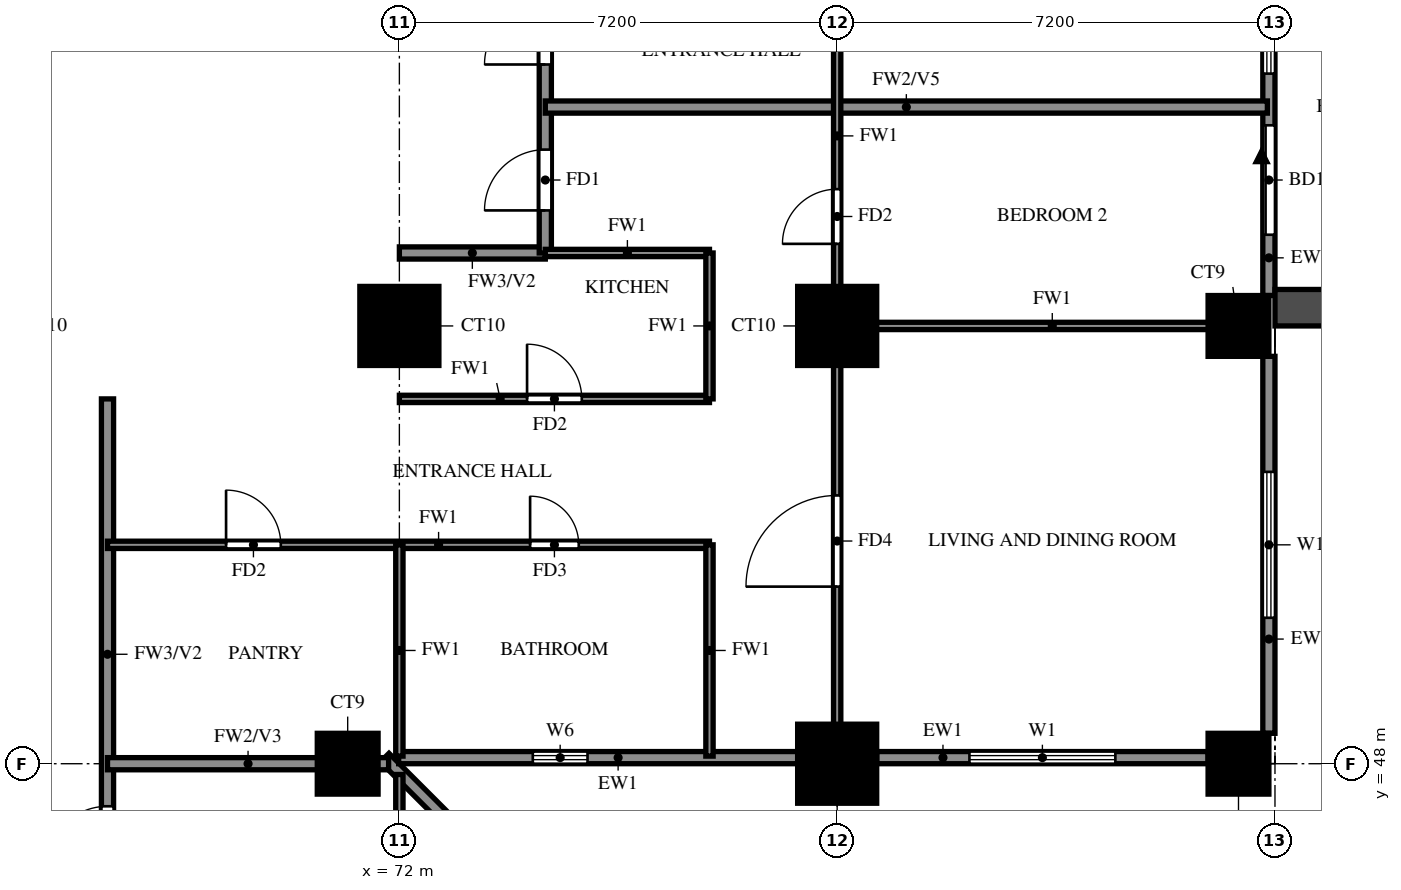
"""IFC4 building model, lengths in metres.
Left out: names, types, materials, properties, quantities, classifications, styles, units other than length and angle.
Written with IfcOpenShell. Run it as: python <this file> out.ifc"""

import sys

from ifc_helpers import new_model, si_unit, direction, frame, frame_2d, origin, origin_2d, place, context, subcontext, project, spatial, rectangle, extrude, source, transform, mapped, element, fill, save


model = new_model("IFC4")
c1 = context("Model", 3, precision=1e-05, world=origin(), true_north=direction((0.0, 1.0)))
c2 = subcontext(c1, "Body", "Model", "MODEL_VIEW")
j1 = project(units=[si_unit("LENGTHUNIT", "METRE"), si_unit("PLANEANGLEUNIT", "RADIAN")], contexts=[c1])
p1 = place(None, origin())
s1 = spatial("IfcSite", under=j1, at=p1, CompositionType="ELEMENT")
p2 = place(p1, origin())
s2 = spatial("IfcBuilding", under=s1, at=p2, CompositionType="ELEMENT")
p3 = place(p2, frame((0.0, 0.0, 86.5)))
s3 = spatial("IfcBuildingStorey", under=s2, at=p3, CompositionType="ELEMENT", Elevation=86.5)
m1 = source(origin(), c2, "Body", "SweptSolid", [
    extrude(rectangle(XDim=1.0, YDim=1.0, at=origin_2d()), origin(), (0.0, 0.0, 1.0), 3.18),
])
p4 = place(p3, frame((71.15, 48.0, 0.0), z_axis=(0.0, 0.0, 1.0), x_axis=(1.0, 0.0, 0.0)))
e1 = element("IfcColumn", 1, at=p4, inside=s3, PredefinedType="COLUMN", context=c2, shape_type="MappedRepresentation", body=[
    mapped(m1, transform((0.0, 0.0, 0.0))),
])
m2 = source(origin(), c2, "Body", "SweptSolid", [
    extrude(rectangle(XDim=1.3, YDim=1.3, at=origin_2d()), origin(), (0.0, 0.0, 1.0), 3.18),
])
p5 = place(p3, frame((79.2, 48.0, 0.0), z_axis=(0.0, 0.0, 1.0), x_axis=(1.0, 0.0, 0.0)))
e2 = element("IfcColumn", 2, at=p5, inside=s3, PredefinedType="COLUMN", context=c2, shape_type="MappedRepresentation", body=[
    mapped(m2, transform((0.0, 0.0, 0.0))),
])
p6 = place(p3, frame((85.8, 48.0, 0.0), z_axis=(0.0, 0.0, 1.0), x_axis=(1.0, 0.0, 0.0)))
e3 = element("IfcColumn", 3, at=p6, inside=s3, PredefinedType="COLUMN", context=c2, shape_type="MappedRepresentation", body=[
    mapped(m1, transform((0.0, 0.0, 0.0))),
])
for number, where, z_axis, x_axis in (
    (4, (72.0, 55.2, 0.0), (0.0, 0.0, 1.0), (1.0, 0.0, 0.0)),
    (5, (79.2, 55.2, 0.0), (0.0, 0.0, 1.0), (1.0, 0.0, 0.0)),
):
    element("IfcColumn", number, at=place(p3, frame(where, z_axis=z_axis, x_axis=x_axis)), inside=s3, PredefinedType="COLUMN", context=c2, shape_type="MappedRepresentation", body=[
        mapped(m2, transform((0.0, 0.0, 0.0))),
    ])
p7 = place(p3, frame((85.8, 55.2, 0.0), z_axis=(0.0, 0.0, 1.0), x_axis=(1.0, 0.0, 0.0)))
e6 = element("IfcColumn", 6, at=p7, inside=s3, PredefinedType="COLUMN", context=c2, shape_type="MappedRepresentation", body=[
    mapped(m1, transform((0.0, 0.0, 0.0))),
])
p8 = place(p3, frame((85.996, 33.863, 0.0), z_axis=(0.0, 0.0, 1.0), x_axis=(-0.707100718496, 0.707112843825, 0.0)))
e7 = element("IfcWall", 7, at=p8, inside=s3, PredefinedType="SOLIDWALL", context=c2, shape_type="SweptSolid", body=[
    extrude(rectangle(XDim=20.135, YDim=0.2, at=frame_2d((10.067, 0.0))), origin(), (0.0, 0.0, 1.0), 3.18),
])
p9 = place(p3, frame((71.989, 48.1, 0.0), z_axis=(0.0, 0.0, 1.0), x_axis=(1.0, 0.0, 0.0)))
e8 = element("IfcWall", 8, at=p9, inside=s3, PredefinedType="SOLIDWALL", context=c2, shape_type="SweptSolid", body=[
    extrude(rectangle(XDim=6.562, YDim=0.2, at=frame_2d((3.281, 0.0))), origin(), (0.0, 0.0, 1.0), 3.18),
])
p10 = place(p9, frame((2.206, 0.0, 1.5)))
e9 = element("IfcOpeningElement", 9, at=p10, cuts=e8, PredefinedType="OPENING", context=c2, shape_type="SweptSolid", body=[
    extrude(rectangle(XDim=0.9, YDim=0.9, at=frame_2d((0.45, 0.45))), frame((0.0, 0.11, 0.0), z_axis=(0.0, -1.0, 0.0), x_axis=(1.0, 0.0, 0.0)), (0.0, 0.0, 1.0), 0.22),
])
p11 = place(p3, frame((79.85, 48.1, 0.0), z_axis=(0.0, 0.0, 1.0), x_axis=(1.0, 0.0, 0.0)))
e10 = element("IfcWall", 10, at=p11, inside=s3, PredefinedType="SOLIDWALL", context=c2, shape_type="SweptSolid", body=[
    extrude(rectangle(XDim=5.45, YDim=0.2, at=frame_2d((2.725, 0.0))), origin(), (0.0, 0.0, 1.0), 3.18),
])
p12 = place(p11, frame((1.525, 0.0, 0.6)))
e11 = element("IfcOpeningElement", 11, at=p12, cuts=e10, PredefinedType="OPENING", context=c2, shape_type="SweptSolid", body=[
    extrude(rectangle(XDim=2.4, YDim=2.4, at=frame_2d((1.2, 1.2))), frame((0.0, 0.11, 0.0), z_axis=(0.0, -1.0, 0.0), x_axis=(1.0, 0.0, 0.0)), (0.0, 0.0, 1.0), 0.22),
])
p13 = place(p3, frame((86.3, 48.5, 0.0), z_axis=(0.0, 0.0, 1.0), x_axis=(0.0, 1.0, 0.0)))
e12 = element("IfcWall", 12, at=p13, inside=s3, PredefinedType="SOLIDWALL", context=c2, shape_type="SweptSolid", body=[
    extrude(rectangle(XDim=6.2, YDim=0.2, at=frame_2d((3.1, 0.0))), origin(), (0.0, 0.0, 1.0), 3.18),
])
p14 = place(p13, frame((1.9, 0.0, 0.6)))
e13 = element("IfcOpeningElement", 13, at=p14, cuts=e12, PredefinedType="OPENING", context=c2, shape_type="SweptSolid", body=[
    extrude(rectangle(XDim=2.4, YDim=2.4, at=frame_2d((1.2, 1.2))), frame((0.0, 0.11, 0.0), z_axis=(0.0, -1.0, 0.0), x_axis=(1.0, 0.0, 0.0)), (0.0, 0.0, 1.0), 0.22),
])
p15 = place(p3, frame((86.3, 55.7, 0.0), z_axis=(0.0, 0.0, 1.0), x_axis=(0.0, 1.0, 0.0)))
e14 = element("IfcWall", 14, at=p15, inside=s3, PredefinedType="SOLIDWALL", context=c2, shape_type="SweptSolid", body=[
    extrude(rectangle(XDim=6.2, YDim=0.2, at=frame_2d((3.1, 0.0))), origin(), (0.0, 0.0, 1.0), 3.18),
])
p16 = place(p15, frame((1.0, 0.0, 0.0)))
e15 = element("IfcOpeningElement", 15, at=p16, cuts=e14, PredefinedType="OPENING", context=c2, shape_type="SweptSolid", body=[
    extrude(rectangle(XDim=1.8, YDim=2.4, at=frame_2d((0.9, 1.2))), frame((0.0, 0.11, 0.0), z_axis=(0.0, -1.0, 0.0), x_axis=(1.0, 0.0, 0.0)), (0.0, 0.0, 1.0), 0.22),
])
p17 = place(p15, frame((3.65, 0.0, 0.6)))
e16 = element("IfcOpeningElement", 16, at=p17, cuts=e14, PredefinedType="OPENING", context=c2, shape_type="SweptSolid", body=[
    extrude(rectangle(XDim=1.8, YDim=2.4, at=frame_2d((0.9, 1.2))), frame((0.0, 0.11, 0.0), z_axis=(0.0, -1.0, 0.0), x_axis=(1.0, 0.0, 0.0)), (0.0, 0.0, 1.0), 0.22),
])
p18 = place(p3, frame((86.4, 55.5, 0.0), z_axis=(0.0, 0.0, 1.0), x_axis=(1.0, 0.0, 0.0)))
e17 = element("IfcWall", 17, at=p18, inside=s3, PredefinedType="SOLIDWALL", context=c2, shape_type="SweptSolid", body=[
    extrude(rectangle(XDim=2.7, YDim=0.6, at=frame_2d((1.35, 0.0))), origin(), (0.0, 0.0, 1.0), 2.85),
])
p19 = place(p3, frame((72.0, 56.4, 0.0), z_axis=(0.0, 0.0, 1.0), x_axis=(1.0, 0.0, 0.0)))
e18 = element("IfcWall", 18, at=p19, inside=s3, PredefinedType="SOLIDWALL", context=c2, shape_type="SweptSolid", body=[
    extrude(rectangle(XDim=2.4, YDim=0.2, at=frame_2d((1.2, 0.0))), origin(), (0.0, 0.0, 1.0), 3.18),
])
p20 = place(p3, frame((67.2, 45.6, 0.0), z_axis=(0.0, 0.0, 1.0), x_axis=(0.0, 1.0, 0.0)))
e19 = element("IfcWall", 19, at=p20, inside=s3, PredefinedType="SOLIDWALL", context=c2, shape_type="SweptSolid", body=[
    extrude(rectangle(XDim=8.4, YDim=0.2, at=frame_2d((4.2, 0.0))), origin(), (0.0, 0.0, 1.0), 3.18),
])
p21 = place(p20, frame((0.7, 0.0, 0.0)))
e20 = element("IfcOpeningElement", 20, at=p21, cuts=e19, PredefinedType="OPENING", context=c2, shape_type="SweptSolid", body=[
    extrude(rectangle(XDim=1.0, YDim=2.1, at=frame_2d((0.5, 1.05))), frame((0.0, 0.11, 0.0), z_axis=(0.0, -1.0, 0.0), x_axis=(1.0, 0.0, 0.0)), (0.0, 0.0, 1.0), 0.22),
])
p22 = place(p3, frame((74.4, 56.4, 0.0), z_axis=(0.0, 0.0, 1.0), x_axis=(0.0, 1.0, 0.0)))
e21 = element("IfcWall", 21, at=p22, inside=s3, PredefinedType="SOLIDWALL", context=c2, shape_type="SweptSolid", body=[
    extrude(rectangle(XDim=9.6, YDim=0.2, at=frame_2d((4.8, 0.0))), origin(), (0.0, 0.0, 1.0), 3.18),
])
p23 = place(p22, frame((0.7, 0.0, 0.0)))
e22 = element("IfcOpeningElement", 22, at=p23, cuts=e21, PredefinedType="OPENING", context=c2, shape_type="SweptSolid", body=[
    extrude(rectangle(XDim=1.0, YDim=2.1, at=frame_2d((0.5, 1.05))), frame((0.0, 0.11, 0.0), z_axis=(0.0, -1.0, 0.0), x_axis=(1.0, 0.0, 0.0)), (0.0, 0.0, 1.0), 0.22),
])
p24 = place(p22, frame((3.1, 0.0, 0.0)))
e23 = element("IfcOpeningElement", 23, at=p24, cuts=e21, PredefinedType="OPENING", context=c2, shape_type="SweptSolid", body=[
    extrude(rectangle(XDim=1.0, YDim=2.1, at=frame_2d((0.5, 1.05))), frame((0.0, 0.11, 0.0), z_axis=(0.0, -1.0, 0.0), x_axis=(1.0, 0.0, 0.0)), (0.0, 0.0, 1.0), 0.22),
])
p25 = place(p3, frame((67.2, 48.0, 0.0), z_axis=(0.0, 0.0, 1.0), x_axis=(1.0, 0.0, 0.0)))
e24 = element("IfcWall", 24, at=p25, inside=s3, PredefinedType="SOLIDWALL", context=c2, shape_type="SweptSolid", body=[
    extrude(rectangle(XDim=4.623, YDim=0.2, at=frame_2d((2.312, 0.0))), origin(), (0.0, 0.0, 1.0), 3.18),
])
p26 = place(p3, frame((74.4, 58.8, 0.0), z_axis=(0.0, 0.0, 1.0), x_axis=(1.0, 0.0, 0.0)))
e25 = element("IfcWall", 25, at=p26, inside=s3, PredefinedType="SOLIDWALL", context=c2, shape_type="SweptSolid", body=[
    extrude(rectangle(XDim=11.875, YDim=0.2, at=frame_2d((5.938, 0.0))), origin(), (0.0, 0.0, 1.0), 2.28),
])
p27 = place(p3, frame((67.2, 51.6, 0.0), z_axis=(0.0, 0.0, 1.0), x_axis=(1.0, 0.0, 0.0)))
e26 = element("IfcWall", 26, at=p27, inside=s3, PredefinedType="PARTITIONING", context=c2, shape_type="SweptSolid", body=[
    extrude(rectangle(XDim=9.9, YDim=0.12, at=frame_2d((4.95, 0.0))), origin(), (0.0, 0.0, 1.0), 3.18),
])
p28 = place(p27, frame((6.95, 0.0, 0.0)))
e27 = element("IfcOpeningElement", 27, at=p28, cuts=e26, PredefinedType="OPENING", context=c2, shape_type="SweptSolid", body=[
    extrude(rectangle(XDim=0.8, YDim=2.1, at=frame_2d((0.4, 1.05))), frame((0.0, 0.07, 0.0), z_axis=(0.0, -1.0, 0.0), x_axis=(1.0, 0.0, 0.0)), (0.0, 0.0, 1.0), 0.14),
])
p29 = place(p27, frame((1.95, 0.0, 0.0)))
e28 = element("IfcOpeningElement", 28, at=p29, cuts=e26, PredefinedType="OPENING", context=c2, shape_type="SweptSolid", body=[
    extrude(rectangle(XDim=0.9, YDim=2.1, at=frame_2d((0.45, 1.05))), frame((0.0, 0.07, 0.0), z_axis=(0.0, -1.0, 0.0), x_axis=(1.0, 0.0, 0.0)), (0.0, 0.0, 1.0), 0.14),
])
p30 = place(p3, frame((72.0, 54.0, 0.0), z_axis=(0.0, 0.0, 1.0), x_axis=(1.0, 0.0, 0.0)))
e29 = element("IfcWall", 29, at=p30, inside=s3, PredefinedType="PARTITIONING", context=c2, shape_type="SweptSolid", body=[
    extrude(rectangle(XDim=5.1, YDim=0.12, at=frame_2d((2.55, 0.0))), origin(), (0.0, 0.0, 1.0), 3.18),
])
p31 = place(p30, frame((2.1, 0.0, 0.0)))
e30 = element("IfcOpeningElement", 30, at=p31, cuts=e29, PredefinedType="OPENING", context=c2, shape_type="SweptSolid", body=[
    extrude(rectangle(XDim=0.9, YDim=2.1, at=frame_2d((0.45, 1.05))), frame((0.0, 0.07, 0.0), z_axis=(0.0, -1.0, 0.0), x_axis=(1.0, 0.0, 0.0)), (0.0, 0.0, 1.0), 0.14),
])
p32 = place(p3, frame((79.2, 55.2, 0.0), z_axis=(0.0, 0.0, 1.0), x_axis=(1.0, 0.0, 0.0)))
e31 = element("IfcWall", 31, at=p32, inside=s3, PredefinedType="PARTITIONING", context=c2, shape_type="SweptSolid", body=[
    extrude(rectangle(XDim=7.075, YDim=0.12, at=frame_2d((3.538, 0.0))), origin(), (0.0, 0.0, 1.0), 3.18),
])
p33 = place(p3, frame((74.4, 56.4, 0.0), z_axis=(0.0, 0.0, 1.0), x_axis=(1.0, 0.0, 0.0)))
e32 = element("IfcWall", 32, at=p33, inside=s3, PredefinedType="PARTITIONING", context=c2, shape_type="SweptSolid", body=[
    extrude(rectangle(XDim=2.7, YDim=0.12, at=frame_2d((1.35, 0.0))), origin(), (0.0, 0.0, 1.0), 3.18),
])
p34 = place(p3, frame((72.0, 33.725, 0.0), z_axis=(0.0, 0.0, 1.0), x_axis=(0.0, 1.0, 0.0)))
e33 = element("IfcWall", 33, at=p34, inside=s3, PredefinedType="PARTITIONING", context=c2, shape_type="SweptSolid", body=[
    extrude(rectangle(XDim=14.098, YDim=0.12, at=frame_2d((7.049, 0.0))), origin(), (0.0, 0.0, 1.0), 2.28),
])
p35 = place(p34, frame((10.075, 0.0, 0.0)))
e34 = element("IfcOpeningElement", 34, at=p35, cuts=e33, PredefinedType="OPENING", context=c2, shape_type="SweptSolid", body=[
    extrude(rectangle(XDim=0.9, YDim=2.1, at=frame_2d((0.45, 1.05))), frame((0.0, 0.07, 0.0), z_axis=(0.0, -1.0, 0.0), x_axis=(1.0, 0.0, 0.0)), (0.0, 0.0, 1.0), 0.14),
])
for number, where, z_axis, x_axis in (
    (35, (72.0, 48.125, 0.0), (0.0, 0.0, 1.0), (0.0, 1.0, 0.0)),
    (36, (77.1, 48.125, 0.0), (0.0, 0.0, 1.0), (0.0, 1.0, 0.0)),
):
    element("IfcWall", number, at=place(p3, frame(where, z_axis=z_axis, x_axis=x_axis)), inside=s3, PredefinedType="PARTITIONING", context=c2, shape_type="SweptSolid", body=[
        extrude(rectangle(XDim=3.475, YDim=0.12, at=frame_2d((1.738, 0.0))), origin(), (0.0, 0.0, 1.0), 3.18),
    ])
p36 = place(p3, frame((77.1, 54.0, 0.0), z_axis=(0.0, 0.0, 1.0), x_axis=(0.0, 1.0, 0.0)))
e37 = element("IfcWall", 37, at=p36, inside=s3, PredefinedType="PARTITIONING", context=c2, shape_type="SweptSolid", body=[
    extrude(rectangle(XDim=2.4, YDim=0.12, at=frame_2d((1.2, 0.0))), origin(), (0.0, 0.0, 1.0), 3.18),
])
p37 = place(p3, frame((79.2, 48.125, 0.0), z_axis=(0.0, 0.0, 1.0), x_axis=(0.0, 1.0, 0.0)))
e38 = element("IfcWall", 38, at=p37, inside=s3, PredefinedType="PARTITIONING", context=c2, shape_type="SweptSolid", body=[
    extrude(rectangle(XDim=21.475, YDim=0.12, at=frame_2d((10.738, 0.0))), origin(), (0.0, 0.0, 1.0), 3.18),
])
p38 = place(p37, frame((2.788, 0.0, 0.0)))
e39 = element("IfcOpeningElement", 39, at=p38, cuts=e38, PredefinedType="OPENING", context=c2, shape_type="SweptSolid", body=[
    extrude(rectangle(XDim=1.5, YDim=2.1, at=frame_2d((0.75, 1.05))), frame((0.0, 0.07, 0.0), z_axis=(0.0, -1.0, 0.0), x_axis=(1.0, 0.0, 0.0)), (0.0, 0.0, 1.0), 0.14),
])
p39 = place(p37, frame((8.425, 0.0, 0.0)))
e40 = element("IfcOpeningElement", 40, at=p39, cuts=e38, PredefinedType="OPENING", context=c2, shape_type="SweptSolid", body=[
    extrude(rectangle(XDim=0.9, YDim=2.1, at=frame_2d((0.45, 1.05))), frame((0.0, 0.07, 0.0), z_axis=(0.0, -1.0, 0.0), x_axis=(1.0, 0.0, 0.0)), (0.0, 0.0, 1.0), 0.14),
])
p40 = place(p37, frame((12.025, 0.0, 0.0)))
e41 = element("IfcOpeningElement", 41, at=p40, cuts=e38, PredefinedType="OPENING", context=c2, shape_type="SweptSolid", body=[
    extrude(rectangle(XDim=0.9, YDim=2.1, at=frame_2d((0.45, 1.05))), frame((0.0, 0.07, 0.0), z_axis=(0.0, -1.0, 0.0), x_axis=(1.0, 0.0, 0.0)), (0.0, 0.0, 1.0), 0.14),
])
p41 = place(p37, frame((17.425, 0.0, 0.0)))
e42 = element("IfcOpeningElement", 42, at=p41, cuts=e38, PredefinedType="OPENING", context=c2, shape_type="SweptSolid", body=[
    extrude(rectangle(XDim=0.9, YDim=2.1, at=frame_2d((0.45, 1.05))), frame((0.0, 0.07, 0.0), z_axis=(0.0, -1.0, 0.0), x_axis=(1.0, 0.0, 0.0)), (0.0, 0.0, 1.0), 0.14),
])
p42 = place(p10, origin())
e43 = element("IfcWindow", 43, at=p42, inside=s3, PartitioningType="SINGLE_PANEL", PredefinedType="WINDOW", context=c2, shape_type="SweptSolid", body=[
    extrude(rectangle(XDim=0.9, YDim=0.9, at=frame_2d((0.45, 0.45))), frame((0.0, 0.03, 0.0), z_axis=(0.0, -1.0, 0.0), x_axis=(1.0, 0.0, 0.0)), (0.0, 0.0, 1.0), 0.06),
])
fill(e9, e43)
p43 = place(p12, origin())
e44 = element("IfcWindow", 44, at=p43, inside=s3, PartitioningType="DOUBLE_PANEL_VERTICAL", PredefinedType="WINDOW", context=c2, shape_type="SweptSolid", body=[
    extrude(rectangle(XDim=2.4, YDim=2.4, at=frame_2d((1.2, 1.2))), frame((0.0, 0.03, 0.0), z_axis=(0.0, -1.0, 0.0), x_axis=(1.0, 0.0, 0.0)), (0.0, 0.0, 1.0), 0.06),
])
fill(e11, e44)
p44 = place(p14, origin())
e45 = element("IfcWindow", 45, at=p44, inside=s3, PartitioningType="DOUBLE_PANEL_VERTICAL", PredefinedType="WINDOW", context=c2, shape_type="SweptSolid", body=[
    extrude(rectangle(XDim=2.4, YDim=2.4, at=frame_2d((1.2, 1.2))), frame((0.0, 0.03, 0.0), z_axis=(0.0, -1.0, 0.0), x_axis=(1.0, 0.0, 0.0)), (0.0, 0.0, 1.0), 0.06),
])
fill(e13, e45)
p45 = place(p16, origin())
e46 = element("IfcDoor", 46, at=p45, inside=s3, OperationType="DOUBLE_DOOR_SLIDING", PredefinedType="DOOR", context=c2, shape_type="SweptSolid", body=[
    extrude(rectangle(XDim=1.8, YDim=2.4, at=frame_2d((0.9, 1.2))), frame((0.0, 0.025, 0.0), z_axis=(0.0, -1.0, 0.0), x_axis=(1.0, 0.0, 0.0)), (0.0, 0.0, 1.0), 0.05),
])
fill(e15, e46)
p46 = place(p17, origin())
e47 = element("IfcWindow", 47, at=p46, inside=s3, PartitioningType="DOUBLE_PANEL_VERTICAL", PredefinedType="WINDOW", context=c2, shape_type="SweptSolid", body=[
    extrude(rectangle(XDim=1.8, YDim=2.4, at=frame_2d((0.9, 1.2))), frame((0.0, 0.03, 0.0), z_axis=(0.0, -1.0, 0.0), x_axis=(1.0, 0.0, 0.0)), (0.0, 0.0, 1.0), 0.06),
])
fill(e16, e47)
p47 = place(p23, origin())
e48 = element("IfcDoor", 48, at=p47, inside=s3, OperationType="SINGLE_SWING_RIGHT", PredefinedType="DOOR", context=c2, shape_type="SweptSolid", body=[
    extrude(rectangle(XDim=1.0, YDim=2.1, at=frame_2d((0.5, 1.05))), frame((0.0, 0.025, 0.0), z_axis=(0.0, -1.0, 0.0), x_axis=(1.0, 0.0, 0.0)), (0.0, 0.0, 1.0), 0.05),
])
fill(e22, e48)
p48 = place(p38, origin())
e49 = element("IfcDoor", 49, at=p48, inside=s3, OperationType="SINGLE_SWING_LEFT", PredefinedType="DOOR", context=c2, shape_type="SweptSolid", body=[
    extrude(rectangle(XDim=1.5, YDim=2.1, at=frame_2d((0.75, 1.05))), frame((0.0, 0.025, 0.0), z_axis=(0.0, -1.0, 0.0), x_axis=(1.0, 0.0, 0.0)), (0.0, 0.0, 1.0), 0.05),
])
fill(e39, e49)
p49 = place(p39, origin())
e50 = element("IfcDoor", 50, at=p49, inside=s3, OperationType="SINGLE_SWING_LEFT", PredefinedType="DOOR", context=c2, shape_type="SweptSolid", body=[
    extrude(rectangle(XDim=0.9, YDim=2.1, at=frame_2d((0.45, 1.05))), frame((0.0, 0.025, 0.0), z_axis=(0.0, -1.0, 0.0), x_axis=(1.0, 0.0, 0.0)), (0.0, 0.0, 1.0), 0.05),
])
fill(e40, e50)
p50 = place(p28, origin())
e51 = element("IfcDoor", 51, at=p50, inside=s3, OperationType="SINGLE_SWING_RIGHT", PredefinedType="DOOR", context=c2, shape_type="SweptSolid", body=[
    extrude(rectangle(XDim=0.8, YDim=2.1, at=frame_2d((0.4, 1.05))), frame((0.0, 0.025, 0.0), z_axis=(0.0, -1.0, 0.0), x_axis=(1.0, 0.0, 0.0)), (0.0, 0.0, 1.0), 0.05),
])
fill(e27, e51)
p51 = place(p31, origin())
e52 = element("IfcDoor", 52, at=p51, inside=s3, OperationType="SINGLE_SWING_LEFT", PredefinedType="DOOR", context=c2, shape_type="SweptSolid", body=[
    extrude(rectangle(XDim=0.9, YDim=2.1, at=frame_2d((0.45, 1.05))), frame((0.0, 0.025, 0.0), z_axis=(0.0, -1.0, 0.0), x_axis=(1.0, 0.0, 0.0)), (0.0, 0.0, 1.0), 0.05),
])
fill(e30, e52)
p52 = place(p29, origin())
e53 = element("IfcDoor", 53, at=p52, inside=s3, OperationType="SINGLE_SWING_LEFT", PredefinedType="DOOR", context=c2, shape_type="SweptSolid", body=[
    extrude(rectangle(XDim=0.9, YDim=2.1, at=frame_2d((0.45, 1.05))), frame((0.0, 0.025, 0.0), z_axis=(0.0, -1.0, 0.0), x_axis=(1.0, 0.0, 0.0)), (0.0, 0.0, 1.0), 0.05),
])
fill(e28, e53)
p53 = place(p24, origin())
e54 = element("IfcDoor", 54, at=p53, inside=s3, OperationType="SINGLE_SWING_LEFT", PredefinedType="DOOR", context=c2, shape_type="SweptSolid", body=[
    extrude(rectangle(XDim=1.0, YDim=2.1, at=frame_2d((0.5, 1.05))), frame((0.0, 0.025, 0.0), z_axis=(0.0, -1.0, 0.0), x_axis=(1.0, 0.0, 0.0)), (0.0, 0.0, 1.0), 0.05),
])
fill(e23, e54)
p54 = place(p21, origin())
e55 = element("IfcDoor", 55, at=p54, inside=s3, OperationType="SINGLE_SWING_LEFT", PredefinedType="DOOR", context=c2, shape_type="SweptSolid", body=[
    extrude(rectangle(XDim=1.0, YDim=2.1, at=frame_2d((0.5, 1.05))), frame((0.0, 0.025, 0.0), z_axis=(0.0, -1.0, 0.0), x_axis=(1.0, 0.0, 0.0)), (0.0, 0.0, 1.0), 0.05),
])
fill(e20, e55)
save(model, sys.argv[1])
